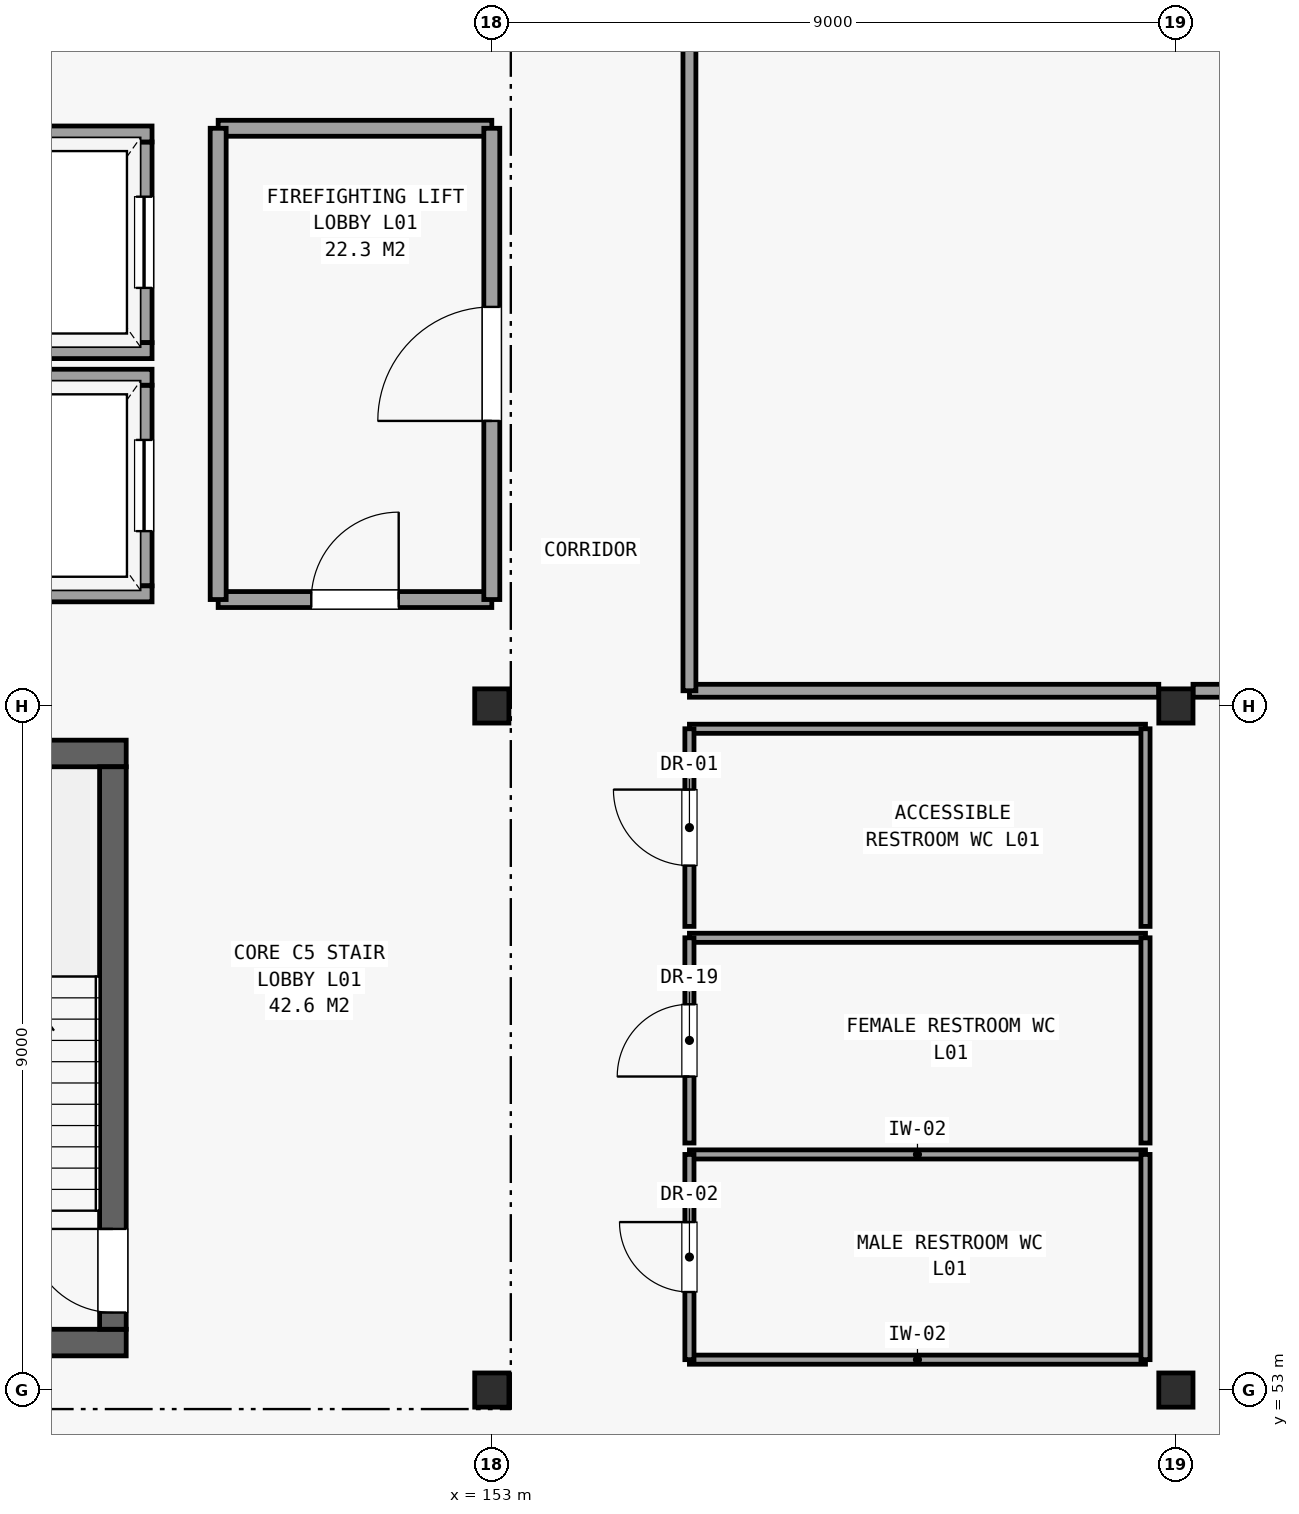
"""IFC4 building model, lengths in metres.
Left out: names, types, materials, properties, quantities, classifications, styles, units other than length and angle.
Written with IfcOpenShell. Run it as: python <this file> out.ifc"""

import sys

from ifc_helpers import new_model, si_unit, direction, frame, frame_2d, origin, origin_2d, place, context, subcontext, project, spatial, rectangle, hollow_rectangle, extrude, element, fill, save


model = new_model("IFC4")
c1 = context("Model", 3, precision=1e-05, world=origin(), true_north=direction((0.0, 1.0)))
c2 = subcontext(c1, "Body", "Model", "MODEL_VIEW")
j1 = project(units=[si_unit("LENGTHUNIT", "METRE"), si_unit("PLANEANGLEUNIT", "RADIAN")], contexts=[c1])
p1 = place(None, origin())
s1 = spatial("IfcSite", under=j1, at=p1, CompositionType="ELEMENT")
p2 = place(p1, origin())
s2 = spatial("IfcBuilding", under=s1, at=p2, CompositionType="ELEMENT")
p3 = place(p2, frame((0.0, 0.0, 5.1)))
s3 = spatial("IfcBuildingStorey", under=s2, at=p3, CompositionType="ELEMENT", Elevation=5.1)
for number, where, z_axis, x_axis in (
    (1, (153.0, 53.0, 0.0), (0.0, 0.0, 1.0), (1.0, 0.0, 0.0)),
    (2, (153.0, 62.0, 0.0), (0.0, 0.0, 1.0), (1.0, 0.0, 0.0)),
    (3, (162.0, 53.0, 0.0), (0.0, 0.0, 1.0), (1.0, 0.0, 0.0)),
    (4, (162.0, 62.0, 0.0), (0.0, 0.0, 1.0), (1.0, 0.0, 0.0)),
):
    element("IfcColumn", number, at=place(p3, frame(where, z_axis=z_axis, x_axis=x_axis)), inside=s3, PredefinedType="COLUMN", context=c2, shape_type="SweptSolid", body=[
        extrude(hollow_rectangle(XDim=0.45, YDim=0.45, WallThickness=0.022, at=origin_2d()), origin(), (0.0, 0.0, 1.0), 4.2),
    ])
for number, where, z_axis, x_axis in (
    (5, (144.21, 53.625, 0.0), (0.0, 0.0, 1.0), (1.0, 0.0, 0.0)),
    (6, (144.21, 61.375, 0.0), (0.0, 0.0, 1.0), (1.0, 0.0, 0.0)),
):
    element("IfcWall", number, at=place(p3, frame(where, z_axis=z_axis, x_axis=x_axis)), inside=s3, PredefinedType="SHEAR", context=c2, shape_type="SweptSolid", body=[
        extrude(rectangle(XDim=3.98, YDim=0.35, at=frame_2d((1.99, 0.0))), origin(), (0.0, 0.0, 1.0), 3.94),
    ])
p4 = place(p3, frame((148.015, 53.8, 0.0), z_axis=(0.0, 0.0, 1.0), x_axis=(0.0, 1.0, 0.0)))
e7 = element("IfcWall", 7, at=p4, inside=s3, PredefinedType="SHEAR", context=c2, shape_type="SweptSolid", body=[
    extrude(rectangle(XDim=7.4, YDim=0.35, at=frame_2d((3.7, 0.0))), origin(), (0.0, 0.0, 1.0), 3.94),
])
p5 = place(p4, frame((0.22, 0.0, 0.0)))
e8 = element("IfcOpeningElement", 8, at=p5, cuts=e7, PredefinedType="OPENING", context=c2, shape_type="SweptSolid", body=[
    extrude(rectangle(XDim=1.1, YDim=2.15, at=frame_2d((0.55, 1.075))), frame((0.0, 0.186, 0.0), z_axis=(0.0, -1.0, 0.0), x_axis=(1.0, 0.0, 0.0)), (0.0, 0.0, 1.0), 0.372),
])
p6 = place(p3, frame((148.425, 63.58, 0.0), z_axis=(0.0, 0.0, 1.0), x_axis=(0.0, 1.0, 0.0)))
e9 = element("IfcWall", 9, at=p6, inside=s3, PredefinedType="PARTITIONING", context=c2, shape_type="SweptSolid", body=[
    extrude(rectangle(XDim=2.64, YDim=0.21, at=frame_2d((1.32, 0.0))), origin(), (0.0, 0.0, 1.0), 3.94),
])
p7 = place(p6, frame((0.72, 0.0, 0.0)))
e10 = element("IfcOpeningElement", 10, at=p7, cuts=e9, PredefinedType="OPENING", context=c2, shape_type="SweptSolid", body=[
    extrude(rectangle(XDim=1.2, YDim=2.2, at=frame_2d((0.6, 1.1))), frame((0.0, 0.116, 0.0), z_axis=(0.0, -1.0, 0.0), x_axis=(1.0, 0.0, 0.0)), (0.0, 0.0, 1.0), 0.232),
])
for number, where, z_axis, x_axis in (
    (11, (146.27, 63.475, 0.0), (0.0, 0.0, 1.0), (1.0, 0.0, 0.0)),
    (12, (146.27, 66.325, 0.0), (0.0, 0.0, 1.0), (1.0, 0.0, 0.0)),
):
    element("IfcWall", number, at=place(p3, frame(where, z_axis=z_axis, x_axis=x_axis)), inside=s3, PredefinedType="PARTITIONING", context=c2, shape_type="SweptSolid", body=[
        extrude(rectangle(XDim=2.26, YDim=0.21, at=frame_2d((1.13, 0.0))), origin(), (0.0, 0.0, 1.0), 3.94),
    ])
p8 = place(p3, frame((148.425, 66.78, 0.0), z_axis=(0.0, 0.0, 1.0), x_axis=(0.0, 1.0, 0.0)))
e13 = element("IfcWall", 13, at=p8, inside=s3, PredefinedType="PARTITIONING", context=c2, shape_type="SweptSolid", body=[
    extrude(rectangle(XDim=2.64, YDim=0.21, at=frame_2d((1.32, 0.0))), origin(), (0.0, 0.0, 1.0), 3.94),
])
p9 = place(p8, frame((0.72, 0.0, 0.0)))
e14 = element("IfcOpeningElement", 14, at=p9, cuts=e13, PredefinedType="OPENING", context=c2, shape_type="SweptSolid", body=[
    extrude(rectangle(XDim=1.2, YDim=2.2, at=frame_2d((0.6, 1.1))), frame((0.0, 0.116, 0.0), z_axis=(0.0, -1.0, 0.0), x_axis=(1.0, 0.0, 0.0)), (0.0, 0.0, 1.0), 0.232),
])
for number, where, z_axis, x_axis in (
    (15, (146.27, 66.675, 0.0), (0.0, 0.0, 1.0), (1.0, 0.0, 0.0)),
    (16, (146.27, 69.525, 0.0), (0.0, 0.0, 1.0), (1.0, 0.0, 0.0)),
):
    element("IfcWall", number, at=place(p3, frame(where, z_axis=z_axis, x_axis=x_axis)), inside=s3, PredefinedType="PARTITIONING", context=c2, shape_type="SweptSolid", body=[
        extrude(rectangle(XDim=2.26, YDim=0.21, at=frame_2d((1.13, 0.0))), origin(), (0.0, 0.0, 1.0), 3.94),
    ])
p10 = place(p3, frame((149.4, 63.4, 0.0), z_axis=(0.0, 0.0, 1.0), x_axis=(1.0, 0.0, 0.0)))
e17 = element("IfcWall", 17, at=p10, inside=s3, PredefinedType="PARTITIONING", context=c2, shape_type="SweptSolid", body=[
    extrude(rectangle(XDim=3.6, YDim=0.21, at=frame_2d((1.8, 0.0))), origin(), (0.0, 0.0, 1.0), 3.3),
])
p11 = place(p10, frame((1.225, 0.0, 0.0)))
e18 = element("IfcOpeningElement", 18, at=p11, cuts=e17, PredefinedType="OPENING", context=c2, shape_type="SweptSolid", body=[
    extrude(rectangle(XDim=1.15, YDim=2.2, at=frame_2d((0.575, 1.1))), frame((0.0, 0.116, 0.0), z_axis=(0.0, -1.0, 0.0), x_axis=(1.0, 0.0, 0.0)), (0.0, 0.0, 1.0), 0.232),
])
p12 = place(p3, frame((149.4, 69.6, 0.0), z_axis=(0.0, 0.0, 1.0), x_axis=(1.0, 0.0, 0.0)))
e19 = element("IfcWall", 19, at=p12, inside=s3, PredefinedType="PARTITIONING", context=c2, shape_type="SweptSolid", body=[
    extrude(rectangle(XDim=3.6, YDim=0.21, at=frame_2d((1.8, 0.0))), origin(), (0.0, 0.0, 1.0), 3.3),
])
p13 = place(p3, frame((149.4, 63.4, 0.0), z_axis=(0.0, 0.0, 1.0), x_axis=(0.0, 1.0, 0.0)))
e20 = element("IfcWall", 20, at=p13, inside=s3, PredefinedType="PARTITIONING", context=c2, shape_type="SweptSolid", body=[
    extrude(rectangle(XDim=6.2, YDim=0.21, at=frame_2d((3.1, 0.0))), origin(), (0.0, 0.0, 1.0), 3.94),
])
p14 = place(p3, frame((153.0, 63.4, 0.0), z_axis=(0.0, 0.0, 1.0), x_axis=(0.0, 1.0, 0.0)))
e21 = element("IfcWall", 21, at=p14, inside=s3, PredefinedType="PARTITIONING", context=c2, shape_type="SweptSolid", body=[
    extrude(rectangle(XDim=6.2, YDim=0.21, at=frame_2d((3.1, 0.0))), origin(), (0.0, 0.0, 1.0), 3.3),
])
p15 = place(p14, frame((2.35, 0.0, 0.0)))
e22 = element("IfcOpeningElement", 22, at=p15, cuts=e21, PredefinedType="OPENING", context=c2, shape_type="SweptSolid", body=[
    extrude(rectangle(XDim=1.5, YDim=2.25, at=frame_2d((0.75, 1.125))), frame((0.0, 0.116, 0.0), z_axis=(0.0, -1.0, 0.0), x_axis=(1.0, 0.0, 0.0)), (0.0, 0.0, 1.0), 0.232),
])
for number, where, z_axis, x_axis in (
    (23, (155.6, 53.4, 0.0), (0.0, 0.0, 1.0), (1.0, 0.0, 0.0)),
    (24, (155.6, 56.1, 0.0), (0.0, 0.0, 1.0), (1.0, 0.0, 0.0)),
):
    element("IfcWall", number, at=place(p3, frame(where, z_axis=z_axis, x_axis=x_axis)), inside=s3, PredefinedType="PARTITIONING", context=c2, shape_type="SweptSolid", body=[
        extrude(rectangle(XDim=6.0, YDim=0.12, at=frame_2d((3.0, 0.0))), origin(), (0.0, 0.0, 1.0), 3.94),
    ])
p16 = place(p3, frame((155.6, 53.4, 0.0), z_axis=(0.0, 0.0, 1.0), x_axis=(0.0, 1.0, 0.0)))
e25 = element("IfcWall", 25, at=p16, inside=s3, PredefinedType="PARTITIONING", context=c2, shape_type="SweptSolid", body=[
    extrude(rectangle(XDim=2.7, YDim=0.12, at=frame_2d((1.35, 0.0))), origin(), (0.0, 0.0, 1.0), 3.94),
])
p17 = place(p16, frame((0.89, 0.0, 0.0)))
e26 = element("IfcOpeningElement", 26, at=p17, cuts=e25, PredefinedType="OPENING", context=c2, shape_type="SweptSolid", body=[
    extrude(rectangle(XDim=0.92, YDim=2.1, at=frame_2d((0.46, 1.05))), frame((0.0, 0.071, 0.0), z_axis=(0.0, -1.0, 0.0), x_axis=(1.0, 0.0, 0.0)), (0.0, 0.0, 1.0), 0.142),
])
p18 = place(p3, frame((161.6, 53.4, 0.0), z_axis=(0.0, 0.0, 1.0), x_axis=(0.0, 1.0, 0.0)))
e27 = element("IfcWall", 27, at=p18, inside=s3, PredefinedType="PARTITIONING", context=c2, shape_type="SweptSolid", body=[
    extrude(rectangle(XDim=2.7, YDim=0.12, at=frame_2d((1.35, 0.0))), origin(), (0.0, 0.0, 1.0), 3.94),
])
p19 = place(p3, frame((155.6, 58.95, 0.0), z_axis=(0.0, 0.0, 1.0), x_axis=(1.0, 0.0, 0.0)))
e28 = element("IfcWall", 28, at=p19, inside=s3, PredefinedType="PARTITIONING", context=c2, shape_type="SweptSolid", body=[
    extrude(rectangle(XDim=6.0, YDim=0.12, at=frame_2d((3.0, 0.0))), origin(), (0.0, 0.0, 1.0), 3.94),
])
p20 = place(p3, frame((155.6, 56.25, 0.0), z_axis=(0.0, 0.0, 1.0), x_axis=(0.0, 1.0, 0.0)))
e29 = element("IfcWall", 29, at=p20, inside=s3, PredefinedType="PARTITIONING", context=c2, shape_type="SweptSolid", body=[
    extrude(rectangle(XDim=2.7, YDim=0.12, at=frame_2d((1.35, 0.0))), origin(), (0.0, 0.0, 1.0), 3.55),
])
p21 = place(p20, frame((0.875, 0.0, 0.0)))
e30 = element("IfcOpeningElement", 30, at=p21, cuts=e29, PredefinedType="OPENING", context=c2, shape_type="SweptSolid", body=[
    extrude(rectangle(XDim=0.95, YDim=2.15, at=frame_2d((0.475, 1.075))), frame((0.0, 0.071, 0.0), z_axis=(0.0, -1.0, 0.0), x_axis=(1.0, 0.0, 0.0)), (0.0, 0.0, 1.0), 0.142),
])
p22 = place(p3, frame((161.6, 56.25, 0.0), z_axis=(0.0, 0.0, 1.0), x_axis=(0.0, 1.0, 0.0)))
e31 = element("IfcWall", 31, at=p22, inside=s3, PredefinedType="PARTITIONING", context=c2, shape_type="SweptSolid", body=[
    extrude(rectangle(XDim=2.7, YDim=0.12, at=frame_2d((1.35, 0.0))), origin(), (0.0, 0.0, 1.0), 3.55),
])
p23 = place(p3, frame((155.6, 61.7, 0.0), z_axis=(0.0, 0.0, 1.0), x_axis=(1.0, 0.0, 0.0)))
e32 = element("IfcWall", 32, at=p23, inside=s3, PredefinedType="PARTITIONING", context=c2, shape_type="SweptSolid", body=[
    extrude(rectangle(XDim=6.0, YDim=0.12, at=frame_2d((3.0, 0.0))), origin(), (0.0, 0.0, 1.0), 3.362),
])
p24 = place(p3, frame((155.6, 59.1, 0.0), z_axis=(0.0, 0.0, 1.0), x_axis=(0.0, 1.0, 0.0)))
e33 = element("IfcWall", 33, at=p24, inside=s3, PredefinedType="PARTITIONING", context=c2, shape_type="SweptSolid", body=[
    extrude(rectangle(XDim=2.6, YDim=0.12, at=frame_2d((1.3, 0.0))), origin(), (0.0, 0.0, 1.0), 3.362),
])
p25 = place(p24, frame((0.8, 0.0, 0.0)))
e34 = element("IfcOpeningElement", 34, at=p25, cuts=e33, PredefinedType="OPENING", context=c2, shape_type="SweptSolid", body=[
    extrude(rectangle(XDim=1.0, YDim=2.15, at=frame_2d((0.5, 1.075))), frame((0.0, 0.071, 0.0), z_axis=(0.0, -1.0, 0.0), x_axis=(1.0, 0.0, 0.0)), (0.0, 0.0, 1.0), 0.142),
])
p26 = place(p3, frame((161.6, 59.1, 0.0), z_axis=(0.0, 0.0, 1.0), x_axis=(0.0, 1.0, 0.0)))
e35 = element("IfcWall", 35, at=p26, inside=s3, PredefinedType="PARTITIONING", context=c2, shape_type="SweptSolid", body=[
    extrude(rectangle(XDim=2.6, YDim=0.12, at=frame_2d((1.3, 0.0))), origin(), (0.0, 0.0, 1.0), 3.362),
])
p27 = place(p3, frame((155.6, 62.2, 0.0), z_axis=(0.0, 0.0, 1.0), x_axis=(1.0, 0.0, 0.0)))
e36 = element("IfcWall", 36, at=p27, inside=s3, PredefinedType="PARTITIONING", context=c2, shape_type="SweptSolid", body=[
    extrude(rectangle(XDim=6.175, YDim=0.17, at=frame_2d((3.087, 0.0))), origin(), (0.0, 0.0, 1.0), 3.3),
])
p28 = place(p3, frame((162.225, 62.2, 0.0), z_axis=(0.0, 0.0, 1.0), x_axis=(1.0, 0.0, 0.0)))
e37 = element("IfcWall", 37, at=p28, inside=s3, PredefinedType="PARTITIONING", context=c2, shape_type="SweptSolid", body=[
    extrude(rectangle(XDim=8.55, YDim=0.17, at=frame_2d((4.275, 0.0))), origin(), (0.0, 0.0, 1.0), 3.3),
])
p29 = place(p3, frame((155.6, 62.2, 0.0), z_axis=(0.0, 0.0, 1.0), x_axis=(0.0, 1.0, 0.0)))
e38 = element("IfcWall", 38, at=p29, inside=s3, PredefinedType="PARTITIONING", context=c2, shape_type="SweptSolid", body=[
    extrude(rectangle(XDim=26.6, YDim=0.17, at=frame_2d((13.3, 0.0))), origin(), (0.0, 0.0, 1.0), 3.362),
])
p30 = place(p29, frame((12.85, 0.0, 0.0)))
e39 = element("IfcOpeningElement", 39, at=p30, cuts=e38, PredefinedType="OPENING", context=c2, shape_type="SweptSolid", body=[
    extrude(rectangle(XDim=0.9, YDim=2.15, at=frame_2d((0.45, 1.075))), frame((0.0, 0.096, 0.0), z_axis=(0.0, -1.0, 0.0), x_axis=(1.0, 0.0, 0.0)), (0.0, 0.0, 1.0), 0.192),
])
p31 = place(p5, origin())
e40 = element("IfcDoor", 40, at=p31, inside=s3, OperationType="SINGLE_SWING_RIGHT", PredefinedType="DOOR", context=c2, shape_type="SweptSolid", body=[
    extrude(rectangle(XDim=1.1, YDim=2.15, at=frame_2d((0.55, 1.075))), frame((0.0, 0.025, 0.0), z_axis=(0.0, -1.0, 0.0), x_axis=(1.0, 0.0, 0.0)), (0.0, 0.0, 1.0), 0.05),
])
fill(e8, e40)
p32 = place(p7, origin())
e41 = element("IfcDoor", 41, at=p32, inside=s3, OperationType="SLIDING_TO_RIGHT", PredefinedType="DOOR", context=c2, shape_type="SweptSolid", body=[
    extrude(rectangle(XDim=1.2, YDim=2.2, at=frame_2d((0.6, 1.1))), frame((0.0, 0.025, 0.0), z_axis=(0.0, -1.0, 0.0), x_axis=(1.0, 0.0, 0.0)), (0.0, 0.0, 1.0), 0.05),
])
fill(e10, e41)
p33 = place(p9, origin())
e42 = element("IfcDoor", 42, at=p33, inside=s3, OperationType="SLIDING_TO_LEFT", PredefinedType="DOOR", context=c2, shape_type="SweptSolid", body=[
    extrude(rectangle(XDim=1.2, YDim=2.2, at=frame_2d((0.6, 1.1))), frame((0.0, 0.025, 0.0), z_axis=(0.0, -1.0, 0.0), x_axis=(1.0, 0.0, 0.0)), (0.0, 0.0, 1.0), 0.05),
])
fill(e14, e42)
p34 = place(p11, origin())
e43 = element("IfcDoor", 43, at=p34, inside=s3, OperationType="SINGLE_SWING_RIGHT", PredefinedType="DOOR", context=c2, shape_type="SweptSolid", body=[
    extrude(rectangle(XDim=1.15, YDim=2.2, at=frame_2d((0.575, 1.1))), frame((0.0, 0.025, 0.0), z_axis=(0.0, -1.0, 0.0), x_axis=(1.0, 0.0, 0.0)), (0.0, 0.0, 1.0), 0.05),
])
fill(e18, e43)
p35 = place(p15, origin())
e44 = element("IfcDoor", 44, at=p35, inside=s3, OperationType="SINGLE_SWING_LEFT", PredefinedType="DOOR", context=c2, shape_type="SweptSolid", body=[
    extrude(rectangle(XDim=1.5, YDim=2.25, at=frame_2d((0.75, 1.125))), frame((0.0, 0.025, 0.0), z_axis=(0.0, -1.0, 0.0), x_axis=(1.0, 0.0, 0.0)), (0.0, 0.0, 1.0), 0.05),
])
fill(e22, e44)
p36 = place(p17, origin())
e45 = element("IfcDoor", 45, at=p36, inside=s3, OperationType="SINGLE_SWING_RIGHT", PredefinedType="DOOR", context=c2, shape_type="SweptSolid", body=[
    extrude(rectangle(XDim=0.92, YDim=2.1, at=frame_2d((0.46, 1.05))), frame((0.0, 0.025, 0.0), z_axis=(0.0, -1.0, 0.0), x_axis=(1.0, 0.0, 0.0)), (0.0, 0.0, 1.0), 0.05),
])
fill(e26, e45)
p37 = place(p21, origin())
e46 = element("IfcDoor", 46, at=p37, inside=s3, OperationType="SINGLE_SWING_LEFT", PredefinedType="DOOR", context=c2, shape_type="SweptSolid", body=[
    extrude(rectangle(XDim=0.95, YDim=2.15, at=frame_2d((0.475, 1.075))), frame((0.0, 0.025, 0.0), z_axis=(0.0, -1.0, 0.0), x_axis=(1.0, 0.0, 0.0)), (0.0, 0.0, 1.0), 0.05),
])
fill(e30, e46)
p38 = place(p25, origin())
e47 = element("IfcDoor", 47, at=p38, inside=s3, OperationType="SINGLE_SWING_RIGHT", PredefinedType="DOOR", context=c2, shape_type="SweptSolid", body=[
    extrude(rectangle(XDim=1.0, YDim=2.15, at=frame_2d((0.5, 1.075))), frame((0.0, 0.025, 0.0), z_axis=(0.0, -1.0, 0.0), x_axis=(1.0, 0.0, 0.0)), (0.0, 0.0, 1.0), 0.05),
])
fill(e34, e47)
save(model, sys.argv[1])
